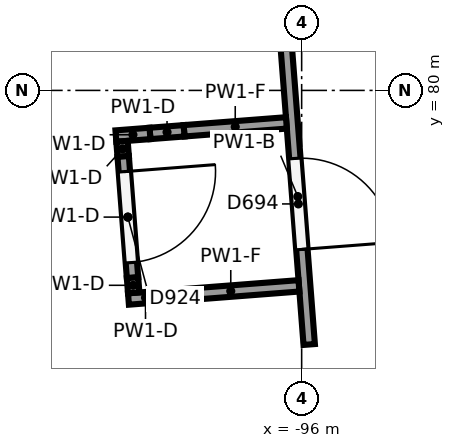
"""IFC4 building model, lengths in metres.
Left out: names, types, materials, properties, quantities, classifications, styles, units other than length and angle.
Written with IfcOpenShell. Run it as: python <this file> out.ifc"""

import sys

from ifc_helpers import new_model, si_unit, direction, frame, frame_2d, origin, place, context, subcontext, project, spatial, rectangle, extrude, element, fill, save


model = new_model("IFC4")
c1 = context("Model", 3, precision=1e-05, world=origin(), true_north=direction((0.0, 1.0)))
c2 = subcontext(c1, "Body", "Model", "MODEL_VIEW")
j1 = project(units=[si_unit("LENGTHUNIT", "METRE"), si_unit("PLANEANGLEUNIT", "RADIAN")], contexts=[c1])
p1 = place(None, origin())
s1 = spatial("IfcSite", under=j1, at=p1, CompositionType="ELEMENT")
p2 = place(p1, origin())
s2 = spatial("IfcBuilding", under=s1, at=p2, CompositionType="ELEMENT")
p3 = place(p2, frame((0.0, 0.0, 6.5)))
s3 = spatial("IfcBuildingStorey", under=s2, at=p3, CompositionType="ELEMENT", Elevation=6.5)
p4 = place(p3, frame((-96.201, 80.55, 0.0), z_axis=(0.0, 0.0, 1.0), x_axis=(0.076969034149, -0.997033483782, 0.0)))
e1 = element("IfcWall", 1, at=p4, inside=s3, PredefinedType="PARTITIONING", context=c2, shape_type="SweptSolid", body=[
    extrude(rectangle(XDim=3.905, YDim=0.15, at=frame_2d((1.952, 0.0))), origin(), (0.0, 0.0, 1.0), 5.05),
])
p5 = place(p4, frame((1.45, 0.0, 0.0)))
e2 = element("IfcOpeningElement", 2, at=p5, cuts=e1, PredefinedType="OPENING", context=c2, shape_type="SweptSolid", body=[
    extrude(rectangle(XDim=1.2, YDim=2.1, at=frame_2d((0.6, 1.05))), frame((0.0, 0.085, 0.0), z_axis=(0.0, -1.0, 0.0), x_axis=(1.0, 0.0, 0.0)), (0.0, 0.0, 1.0), 0.17),
])
p6 = place(p3, frame((-96.201, 79.573, 0.0), z_axis=(0.0, 0.0, 1.0), x_axis=(-0.997028903068, -0.077028348333, 0.0)))
e3 = element("IfcWall", 3, at=p6, inside=s3, PredefinedType="PARTITIONING", context=c2, shape_type="SweptSolid", body=[
    extrude(rectangle(XDim=1.35, YDim=0.15, at=frame_2d((0.675, 0.0))), origin(), (0.0, 0.0, 1.0), 5.1),
])
p7 = place(p3, frame((-97.547, 79.469, 0.0), z_axis=(0.0, 0.0, 1.0), x_axis=(-0.997070419096, -0.076489080029, 0.0)))
e4 = element("IfcWall", 4, at=p7, inside=s3, PredefinedType="PARTITIONING", context=c2, shape_type="SweptSolid", body=[
    extrude(rectangle(XDim=0.45, YDim=0.15, at=frame_2d((0.225, 0.0))), origin(), (0.0, 0.0, 1.0), 3.85),
])
p8 = place(p3, frame((-97.996, 79.434, 0.0), z_axis=(0.0, 0.0, 1.0), x_axis=(-0.997025681882, -0.077070030935, 0.0)))
e5 = element("IfcWall", 5, at=p8, inside=s3, PredefinedType="PARTITIONING", context=c2, shape_type="SweptSolid", body=[
    extrude(rectangle(XDim=0.45, YDim=0.15, at=frame_2d((0.225, 0.0))), origin(), (0.0, 0.0, 1.0), 3.85),
])
p9 = place(p3, frame((-96.035, 77.429, 0.0), z_axis=(0.0, 0.0, 1.0), x_axis=(-0.997028098262, -0.077038764768, 0.0)))
e6 = element("IfcWall", 6, at=p9, inside=s3, PredefinedType="PARTITIONING", context=c2, shape_type="SweptSolid", body=[
    extrude(rectangle(XDim=1.8, YDim=0.15, at=frame_2d((0.9, 0.0))), origin(), (0.0, 0.0, 1.0), 5.1),
])
p10 = place(p3, frame((-97.83, 77.29, 0.0), z_axis=(0.0, 0.0, 1.0), x_axis=(-0.997028903068, -0.077028348333, 0.0)))
e7 = element("IfcWall", 7, at=p10, inside=s3, PredefinedType="PARTITIONING", context=c2, shape_type="SweptSolid", body=[
    extrude(rectangle(XDim=0.45, YDim=0.15, at=frame_2d((0.225, 0.0))), origin(), (0.0, 0.0, 1.0), 3.85),
])
p11 = place(p3, frame((-98.364, 79.33, 0.0), z_axis=(0.0, 0.0, 1.0), x_axis=(0.076883141957, -0.997040110769, 0.0)))
e8 = element("IfcWall", 8, at=p11, inside=s3, PredefinedType="PARTITIONING", context=c2, shape_type="SweptSolid", body=[
    extrude(rectangle(XDim=0.2, YDim=0.15, at=frame_2d((0.1, 0.0))), origin(), (0.0, 0.0, 1.0), 3.85),
])
p12 = place(p3, frame((-98.348, 79.131, 0.0), z_axis=(0.0, 0.0, 1.0), x_axis=(0.076906536042, -0.997038306543, 0.0)))
e9 = element("IfcWall", 9, at=p12, inside=s3, PredefinedType="PARTITIONING", context=c2, shape_type="SweptSolid", body=[
    extrude(rectangle(XDim=1.6, YDim=0.15, at=frame_2d((0.8, 0.0))), origin(), (0.0, 0.0, 1.0), 3.85),
])
p13 = place(p12, frame((0.2, 0.0, 0.0)))
e10 = element("IfcOpeningElement", 10, at=p13, cuts=e9, PredefinedType="OPENING", context=c2, shape_type="SweptSolid", body=[
    extrude(rectangle(XDim=1.2, YDim=2.1, at=frame_2d((0.6, 1.05))), frame((0.0, 0.085, 0.0), z_axis=(0.0, -1.0, 0.0), x_axis=(1.0, 0.0, 0.0)), (0.0, 0.0, 1.0), 0.17),
])
p14 = place(p3, frame((-98.225, 77.536, 0.0), z_axis=(0.0, 0.0, 1.0), x_axis=(0.076883141957, -0.997040110769, 0.0)))
e11 = element("IfcWall", 11, at=p14, inside=s3, PredefinedType="PARTITIONING", context=c2, shape_type="SweptSolid", body=[
    extrude(rectangle(XDim=0.2, YDim=0.15, at=frame_2d((0.1, 0.0))), origin(), (0.0, 0.0, 1.0), 3.85),
])
p15 = place(p5, origin())
e12 = element("IfcDoor", 12, at=p15, inside=s3, OperationType="SINGLE_SWING_RIGHT", PredefinedType="DOOR", context=c2, shape_type="SweptSolid", body=[
    extrude(rectangle(XDim=1.2, YDim=2.1, at=frame_2d((0.6, 1.05))), frame((0.0, 0.025, 0.0), z_axis=(0.0, -1.0, 0.0), x_axis=(1.0, 0.0, 0.0)), (0.0, 0.0, 1.0), 0.05),
])
fill(e2, e12)
p16 = place(p13, origin())
e13 = element("IfcDoor", 13, at=p16, inside=s3, OperationType="SINGLE_SWING_LEFT", PredefinedType="DOOR", context=c2, shape_type="SweptSolid", body=[
    extrude(rectangle(XDim=1.2, YDim=2.1, at=frame_2d((0.6, 1.05))), frame((0.0, 0.025, 0.0), z_axis=(0.0, -1.0, 0.0), x_axis=(1.0, 0.0, 0.0)), (0.0, 0.0, 1.0), 0.05),
])
fill(e10, e13)
save(model, sys.argv[1])
